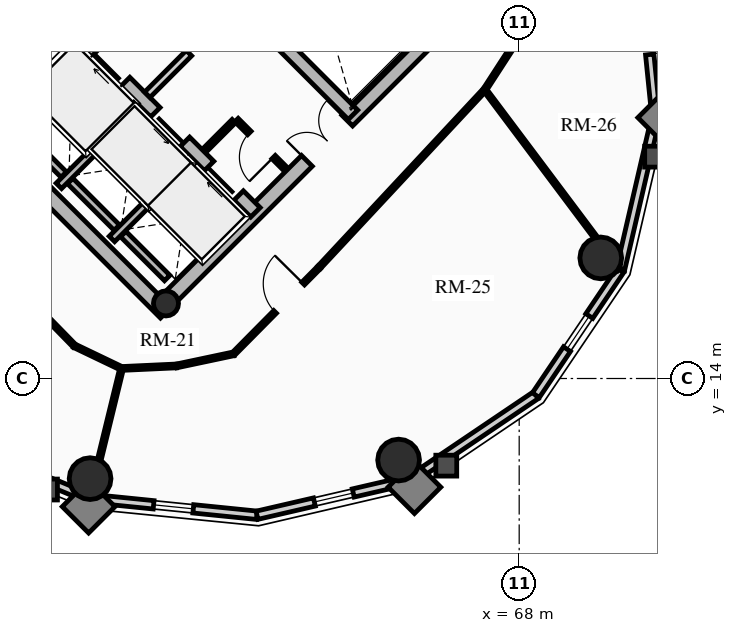
"""IFC4 building model, lengths in metres.
Left out: names, types, materials, properties, quantities, classifications, styles, units other than length and angle.
Written with IfcOpenShell. Run it as: python <this file> out.ifc"""

import sys

from ifc_helpers import new_model, si_unit, direction, frame, frame_2d, origin, origin_2d, place, context, subcontext, project, spatial, rectangle, circle, hollow_circle, extrude, source, transform, mapped, element, fill, save


model = new_model("IFC4")
c1 = context("Model", 3, precision=1e-05, world=origin(), true_north=direction((0.0, 1.0)))
c2 = subcontext(c1, "Body", "Model", "MODEL_VIEW")
j1 = project(units=[si_unit("LENGTHUNIT", "METRE"), si_unit("PLANEANGLEUNIT", "RADIAN")], contexts=[c1])
p1 = place(None, origin())
s1 = spatial("IfcSite", under=j1, at=p1, CompositionType="ELEMENT")
p2 = place(p1, origin())
s2 = spatial("IfcBuilding", under=s1, at=p2, CompositionType="ELEMENT")
p3 = place(p2, frame((0.0, 0.0, 196.66)))
s3 = spatial("IfcBuildingStorey", under=s2, at=p3, CompositionType="ELEMENT", Elevation=196.66)
p4 = place(p3, frame((58.702, 15.732, 0.0), z_axis=(0.0, 0.0, 1.0), x_axis=(-0.707106781187, 0.707106781187, 0.0)))
e1 = element("IfcWall", 1, at=p4, inside=s3, PredefinedType="SHEAR", context=c2, shape_type="SweptSolid", body=[
    extrude(rectangle(XDim=14.1, YDim=0.4, at=frame_2d((7.05, 0.0))), origin(), (0.0, 0.0, 1.0), 2.91),
])
p5 = place(p3, frame((58.561, 15.873, 0.0), z_axis=(0.0, 0.0, 1.0), x_axis=(0.707106781187, 0.707106781187, 0.0)))
e2 = element("IfcWall", 2, at=p5, inside=s3, PredefinedType="SHEAR", context=c2, shape_type="SweptSolid", body=[
    extrude(rectangle(XDim=10.7, YDim=0.4, at=frame_2d((5.35, 0.0))), origin(), (0.0, 0.0, 1.0), 2.91),
])
m1 = source(origin(), c2, "Body", "SweptSolid", [
    extrude(rectangle(XDim=1.5, YDim=2.02, at=frame_2d((0.75, 1.01))), frame((0.0, 0.21, 0.0), z_axis=(0.0, -1.0, 0.0), x_axis=(1.0, 0.0, 0.0)), (0.0, 0.0, 1.0), 0.42),
])
p6 = place(p5, frame((5.45, 0.0, 0.0)))
e3 = element("IfcOpeningElement", 3, at=p6, cuts=e2, PredefinedType="OPENING", context=c2, shape_type="MappedRepresentation", body=[
    mapped(m1, transform((0.0, 0.0, 0.0), x_axis=(1.0, 0.0, 0.0), y_axis=(0.0, 1.0, 0.0), z_axis=(0.0, 0.0, 1.0), scale=1.0)),
])
p7 = place(p3, frame((61.06, 18.373, 0.0), z_axis=(0.0, 0.0, 1.0), x_axis=(-0.707106781187, 0.707106781187, 0.0)))
e4 = element("IfcWall", 4, at=p7, inside=s3, PredefinedType="SHEAR", context=c2, shape_type="SweptSolid", body=[
    extrude(rectangle(XDim=13.7, YDim=0.35, at=frame_2d((6.85, 0.0))), origin(), (0.0, 0.0, 1.0), 2.91),
])
m2 = source(origin(), c2, "Body", "SweptSolid", [
    extrude(rectangle(XDim=1.1, YDim=2.015, at=frame_2d((0.55, 1.007))), frame((0.0, 0.185, 0.0), z_axis=(0.0, -1.0, 0.0), x_axis=(1.0, 0.0, 0.0)), (0.0, 0.0, 1.0), 0.37),
])
p8 = place(p7, frame((4.85, 0.0, 0.0)))
e5 = element("IfcOpeningElement", 5, at=p8, cuts=e4, PredefinedType="OPENING", context=c2, shape_type="MappedRepresentation", body=[
    mapped(m2, transform((0.0, 0.0, 0.0), x_axis=(1.0, 0.0, 0.0), y_axis=(0.0, 1.0, 0.0), z_axis=(0.0, 0.0, 1.0), scale=1.0)),
])
p9 = place(p7, frame((0.625, 0.0, 0.0)))
e6 = element("IfcOpeningElement", 6, at=p9, cuts=e4, PredefinedType="OPENING", context=c2, shape_type="MappedRepresentation", body=[
    mapped(m2, transform((0.0, 0.0, 0.0), x_axis=(1.0, 0.0, 0.0), y_axis=(0.0, 1.0, 0.0), z_axis=(0.0, 0.0, 1.0), scale=1.0)),
])
p10 = place(p7, frame((2.625, 0.0, 0.0)))
e7 = element("IfcOpeningElement", 7, at=p10, cuts=e4, PredefinedType="OPENING", context=c2, shape_type="MappedRepresentation", body=[
    mapped(m2, transform((0.0, 0.0, 0.0), x_axis=(1.0, 0.0, 0.0), y_axis=(0.0, 1.0, 0.0), z_axis=(0.0, 0.0, 1.0), scale=1.0)),
])
m3 = source(origin(), c2, "Body", "SweptSolid", [
    extrude(rectangle(XDim=1.15, YDim=2.02, at=frame_2d((0.575, 1.01))), frame((0.0, 0.185, 0.0), z_axis=(0.0, -1.0, 0.0), x_axis=(1.0, 0.0, 0.0)), (0.0, 0.0, 1.0), 0.37),
])
p11 = place(p7, frame((7.27, 0.0, 0.0)))
e8 = element("IfcOpeningElement", 8, at=p11, cuts=e4, PredefinedType="OPENING", context=c2, shape_type="MappedRepresentation", body=[
    mapped(m3, transform((0.0, 0.0, 0.0), x_axis=(1.0, 0.0, 0.0), y_axis=(0.0, 1.0, 0.0), z_axis=(0.0, 0.0, 1.0), scale=1.0)),
])
p12 = place(p3, frame((63.627, 20.94, 0.0), z_axis=(0.0, 0.0, 1.0), x_axis=(-0.707119496762, 0.707094065383, 0.0)))
e9 = element("IfcWall", 9, at=p12, inside=s3, PredefinedType="SHEAR", context=c2, shape_type="SweptSolid", body=[
    extrude(rectangle(XDim=9.6, YDim=0.35, at=frame_2d((4.8, 0.0))), origin(), (0.0, 0.0, 1.0), 2.91),
])
p13 = place(p12, frame((5.28, 0.0, 0.0)))
e10 = element("IfcOpeningElement", 10, at=p13, cuts=e9, PredefinedType="OPENING", context=c2, shape_type="MappedRepresentation", body=[
    mapped(m3, transform((0.0, 0.0, 0.0), x_axis=(1.0, 0.0, 0.0), y_axis=(0.0, 1.0, 0.0), z_axis=(0.0, 0.0, 1.0), scale=1.0)),
])
p14 = place(p3, frame((53.784, 21.003, 0.0), z_axis=(0.0, 0.0, 1.0), x_axis=(0.707106781187, 0.707106781187, 0.0)))
e11 = element("IfcWall", 11, at=p14, inside=s3, PredefinedType="SHEAR", context=c2, shape_type="SweptSolid", body=[
    extrude(rectangle(XDim=3.285, YDim=0.35, at=frame_2d((1.643, 0.0))), origin(), (0.0, 0.0, 1.0), 2.91),
])
p15 = place(p3, frame((58.706, 15.976, 0.0), z_axis=(0.0, 0.0, 1.0), x_axis=(0.707106781187, 0.707106781187, 0.0)))
e12 = element("IfcColumn", 12, at=p15, inside=s3, PredefinedType="COLUMN", context=c2, shape_type="SweptSolid", body=[
    extrude(hollow_circle(Radius=0.33, WallThickness=0.025, at=origin_2d()), origin(), (0.0, 0.0, 1.0), 2.91),
])
for number, where, z_axis, x_axis in (
    (13, (56.709, 11.365, 0.0), (0.0, 0.0, 1.0), (1.0, 0.0, 0.0)),
    (14, (64.827, 11.854, 0.0), (0.0, 0.0, 1.0), (1.0, 0.0, 0.0)),
    (15, (70.146, 17.173, 0.0), (0.0, 0.0, 1.0), (1.0, 0.0, 0.0)),
):
    element("IfcColumn", number, at=place(p3, frame(where, z_axis=z_axis, x_axis=x_axis)), inside=s3, PredefinedType="USERDEFINED", context=c2, shape_type="SweptSolid", body=[
        extrude(circle(Radius=0.55, at=origin_2d()), origin(), (0.0, 0.0, 1.0), 2.91),
    ])
p16 = place(p3, frame((56.705, 10.845, 0.0), z_axis=(0.0, 0.0, 1.0), x_axis=(-0.924447353237, 0.381309704956, 0.0)))
e16 = element("IfcWall", 16, at=p16, inside=s3, PredefinedType="SOLIDWALL", context=c2, shape_type="SweptSolid", body=[
    extrude(rectangle(XDim=4.671, YDim=0.22, at=frame_2d((2.335, 0.0))), origin(), (0.0, 0.0, 1.0), 2.322),
])
p17 = place(p3, frame((61.1, 10.401, 0.0), z_axis=(0.0, 0.0, 1.0), x_axis=(-0.994929930991, 0.100570534541, 0.0)))
e17 = element("IfcWall", 17, at=p17, inside=s3, PredefinedType="SOLIDWALL", context=c2, shape_type="SweptSolid", body=[
    extrude(rectangle(XDim=4.418, YDim=0.22, at=frame_2d((2.209, 0.0))), origin(), (0.0, 0.0, 1.0), 2.322),
])
m4 = source(origin(), c2, "Body", "SweptSolid", [
    extrude(rectangle(XDim=1.05, YDim=1.3, at=frame_2d((0.525, 0.65))), frame((0.0, 0.12, 0.0), z_axis=(0.0, -1.0, 0.0), x_axis=(1.0, 0.0, 0.0)), (0.0, 0.0, 1.0), 0.24),
])
p18 = place(p17, frame((1.684, 0.0, 0.65)))
e18 = element("IfcOpeningElement", 18, at=p18, cuts=e17, PredefinedType="OPENING", context=c2, shape_type="MappedRepresentation", body=[
    mapped(m4, transform((0.0, 0.0, 0.0), x_axis=(1.0, 0.0, 0.0), y_axis=(0.0, 1.0, 0.0), z_axis=(0.0, 0.0, 1.0), scale=1.0)),
])
p19 = place(p3, frame((65.144, 11.337, 0.0), z_axis=(0.0, 0.0, 1.0), x_axis=(-0.974249228678, -0.225473813158, 0.0)))
e19 = element("IfcWall", 19, at=p19, inside=s3, PredefinedType="SOLIDWALL", context=c2, shape_type="SweptSolid", body=[
    extrude(rectangle(XDim=4.15, YDim=0.22, at=frame_2d((2.075, 0.0))), origin(), (0.0, 0.0, 1.0), 2.322),
])
p20 = place(p19, frame((1.55, 0.0, 0.65)))
e20 = element("IfcOpeningElement", 20, at=p20, cuts=e19, PredefinedType="OPENING", context=c2, shape_type="MappedRepresentation", body=[
    mapped(m4, transform((0.0, 0.0, 0.0), x_axis=(1.0, 0.0, 0.0), y_axis=(0.0, 1.0, 0.0), z_axis=(0.0, 0.0, 1.0), scale=1.0)),
])
p21 = place(p3, frame((68.439, 13.561, 0.0), z_axis=(0.0, 0.0, 1.0), x_axis=(-0.828833723692, -0.559495003079, 0.0)))
e21 = element("IfcWall", 21, at=p21, inside=s3, PredefinedType="SOLIDWALL", context=c2, shape_type="SweptSolid", body=[
    extrude(rectangle(XDim=3.976, YDim=0.22, at=frame_2d((1.988, 0.0))), origin(), (0.0, 0.0, 1.0), 2.322),
])
p22 = place(p3, frame((70.663, 16.856, 0.0), z_axis=(0.0, 0.0, 1.0), x_axis=(-0.559495003079, -0.828833723692, 0.0)))
e22 = element("IfcWall", 22, at=p22, inside=s3, PredefinedType="SOLIDWALL", context=c2, shape_type="SweptSolid", body=[
    extrude(rectangle(XDim=3.976, YDim=0.22, at=frame_2d((1.988, 0.0))), origin(), (0.0, 0.0, 1.0), 2.322),
])
p23 = place(p22, frame((1.463, 0.0, 0.65)))
e23 = element("IfcOpeningElement", 23, at=p23, cuts=e22, PredefinedType="OPENING", context=c2, shape_type="MappedRepresentation", body=[
    mapped(m4, transform((0.0, 0.0, 0.0), x_axis=(1.0, 0.0, 0.0), y_axis=(0.0, 1.0, 0.0), z_axis=(0.0, 0.0, 1.0), scale=1.0)),
])
p24 = place(p3, frame((71.599, 20.9, 0.0), z_axis=(0.0, 0.0, 1.0), x_axis=(-0.225473813158, -0.974249228678, 0.0)))
e24 = element("IfcWall", 24, at=p24, inside=s3, PredefinedType="SOLIDWALL", context=c2, shape_type="SweptSolid", body=[
    extrude(rectangle(XDim=4.15, YDim=0.22, at=frame_2d((2.075, 0.0))), origin(), (0.0, 0.0, 1.0), 2.322),
])
p25 = place(p3, frame((71.155, 25.295, 0.0), z_axis=(0.0, 0.0, 1.0), x_axis=(0.100570534541, -0.994929930991, 0.0)))
e25 = element("IfcWall", 25, at=p25, inside=s3, PredefinedType="SOLIDWALL", context=c2, shape_type="SweptSolid", body=[
    extrude(rectangle(XDim=4.418, YDim=0.22, at=frame_2d((2.209, 0.0))), origin(), (0.0, 0.0, 1.0), 2.322),
])
m5 = source(origin(), c2, "Body", "SweptSolid", [
    extrude(rectangle(XDim=1.15, YDim=2.005, at=frame_2d((0.575, 1.002))), frame((0.0, 0.12, 0.0), z_axis=(0.0, -1.0, 0.0), x_axis=(1.0, 0.0, 0.0)), (0.0, 0.0, 1.0), 0.24),
])
p26 = place(p25, frame((1.634, 0.0, 0.0)))
e26 = element("IfcOpeningElement", 26, at=p26, cuts=e25, PredefinedType="OPENING", context=c2, shape_type="MappedRepresentation", body=[
    mapped(m5, transform((0.0, 0.0, 0.0), x_axis=(1.0, 0.0, 0.0), y_axis=(0.0, 1.0, 0.0), z_axis=(0.0, 0.0, 1.0), scale=1.0)),
])
p27 = place(p3, frame((55.888, 19.069, 0.0), z_axis=(0.0, 0.0, 1.0), x_axis=(0.707106781187, 0.707106781187, 0.0)))
e27 = element("IfcWall", 27, at=p27, inside=s3, PredefinedType="SHEAR", context=c2, shape_type="SweptSolid", body=[
    extrude(rectangle(XDim=2.97, YDim=0.2, at=frame_2d((1.485, 0.0))), origin(), (0.0, 0.0, 1.0), 2.91),
])
p28 = place(p3, frame((56.015, 19.366, 0.0), z_axis=(0.0, 0.0, 1.0), x_axis=(-0.707106781187, 0.707106781187, 0.0)))
e28 = element("IfcWall", 28, at=p28, inside=s3, PredefinedType="SHEAR", context=c2, shape_type="SweptSolid", body=[
    extrude(rectangle(XDim=2.44, YDim=0.2, at=frame_2d((1.22, 0.0))), origin(), (0.0, 0.0, 1.0), 2.91),
])
p29 = place(p3, frame((57.284, 17.673, 0.0), z_axis=(0.0, 0.0, 1.0), x_axis=(0.707147878904, 0.70706568108, 0.0)))
e29 = element("IfcWall", 29, at=p29, inside=s3, PredefinedType="SHEAR", context=c2, shape_type="SweptSolid", body=[
    extrude(rectangle(XDim=2.97, YDim=0.2, at=frame_2d((1.485, 0.0))), origin(), (0.0, 0.0, 1.0), 2.91),
])
p30 = place(p3, frame((57.412, 17.97, 0.0), z_axis=(0.0, 0.0, 1.0), x_axis=(-0.707106781187, 0.707106781187, 0.0)))
e30 = element("IfcWall", 30, at=p30, inside=s3, PredefinedType="SHEAR", context=c2, shape_type="SweptSolid", body=[
    extrude(rectangle(XDim=1.735, YDim=0.2, at=frame_2d((0.867, 0.0))), origin(), (0.0, 0.0, 1.0), 2.91),
])
p31 = place(p3, frame((58.737, 16.644, 0.0), z_axis=(0.0, 0.0, 1.0), x_axis=(-0.707032117043, 0.707181437447, 0.0)))
e31 = element("IfcWall", 31, at=p31, inside=s3, PredefinedType="SHEAR", context=c2, shape_type="SweptSolid", body=[
    extrude(rectangle(XDim=1.635, YDim=0.2, at=frame_2d((0.817, 0.0))), origin(), (0.0, 0.0, 1.0), 2.91),
])
p32 = place(p3, frame((58.214, 21.467, 0.0), z_axis=(0.0, 0.0, 1.0), x_axis=(0.707106781187, 0.707106781187, 0.0)))
e32 = element("IfcWall", 32, at=p32, inside=s3, PredefinedType="PARTITIONING", context=c2, shape_type="SweptSolid", body=[
    extrude(rectangle(XDim=3.28, YDim=0.2, at=frame_2d((1.64, 0.0))), origin(), (0.0, 0.0, 1.0), 2.685),
])
m6 = source(origin(), c2, "Body", "SweptSolid", [
    extrude(rectangle(XDim=1.5, YDim=2.02, at=frame_2d((0.75, 1.01))), frame((0.0, 0.11, 0.0), z_axis=(0.0, -1.0, 0.0), x_axis=(1.0, 0.0, 0.0)), (0.0, 0.0, 1.0), 0.22),
])
p33 = place(p32, frame((1.55, 0.0, 0.0)))
e33 = element("IfcOpeningElement", 33, at=p33, cuts=e32, PredefinedType="OPENING", context=c2, shape_type="MappedRepresentation", body=[
    mapped(m6, transform((0.0, 0.0, 0.0), x_axis=(1.0, 0.0, 0.0), y_axis=(0.0, 1.0, 0.0), z_axis=(0.0, 0.0, 1.0), scale=1.0)),
])
p34 = place(p3, frame((61.835, 19.529, 0.0), z_axis=(0.0, 0.0, 1.0), x_axis=(-0.707174592913, 0.707038962956, 0.0)))
e34 = element("IfcWall", 34, at=p34, inside=s3, PredefinedType="PARTITIONING", context=c2, shape_type="SweptSolid", body=[
    extrude(rectangle(XDim=1.8, YDim=0.125, at=frame_2d((0.9, 0.0))), origin(), (0.0, 0.0, 1.0), 2.685),
])
m7 = source(origin(), c2, "Body", "SweptSolid", [
    extrude(rectangle(XDim=0.9, YDim=2.005, at=frame_2d((0.45, 1.002))), frame((0.0, 0.073, 0.0), z_axis=(0.0, -1.0, 0.0), x_axis=(1.0, 0.0, 0.0)), (0.0, 0.0, 1.0), 0.145),
])
p35 = place(p34, frame((0.42, 0.0, 0.0)))
e35 = element("IfcOpeningElement", 35, at=p35, cuts=e34, PredefinedType="OPENING", context=c2, shape_type="MappedRepresentation", body=[
    mapped(m7, transform((0.0, 0.0, 0.0), x_axis=(1.0, 0.0, 0.0), y_axis=(0.0, 1.0, 0.0), z_axis=(0.0, 0.0, 1.0), scale=1.0)),
])
p36 = place(p3, frame((59.713, 19.996, 0.0), z_axis=(0.0, 0.0, 1.0), x_axis=(0.707217726, 0.706995818963, 0.0)))
e36 = element("IfcWall", 36, at=p36, inside=s3, PredefinedType="PARTITIONING", context=c2, shape_type="SweptSolid", body=[
    extrude(rectangle(XDim=1.1, YDim=0.125, at=frame_2d((0.55, 0.0))), origin(), (0.0, 0.0, 1.0), 2.685),
])
p37 = place(p3, frame((52.126, 19.126, 0.0), z_axis=(0.0, 0.0, 1.0), x_axis=(0.698979087027, -0.715142108884, 0.0)))
e37 = element("IfcWall", 37, at=p37, inside=s3, PredefinedType="MOVABLE", context=c2, shape_type="SweptSolid", body=[
    extrude(rectangle(XDim=5.966, YDim=0.1, at=frame_2d((2.983, 0.0))), origin(), (0.0, 0.0, 1.0), 2.322),
])
p38 = place(p3, frame((56.296, 14.859, 0.0), z_axis=(0.0, 0.0, 1.0), x_axis=(0.90178292445, -0.432189260823, 0.0)))
e38 = element("IfcWall", 38, at=p38, inside=s3, PredefinedType="MOVABLE", context=c2, shape_type="SweptSolid", body=[
    extrude(rectangle(XDim=1.377, YDim=0.1, at=frame_2d((0.688, 0.0))), origin(), (0.0, 0.0, 1.0), 2.255),
])
p39 = place(p3, frame((57.538, 14.264, 0.0), z_axis=(0.0, 0.0, 1.0), x_axis=(0.99892990172, 0.046249880546, 0.0)))
e39 = element("IfcWall", 39, at=p39, inside=s3, PredefinedType="MOVABLE", context=c2, shape_type="SweptSolid", body=[
    extrude(rectangle(XDim=1.446, YDim=0.1, at=frame_2d((0.723, 0.0))), origin(), (0.0, 0.0, 1.0), 2.322),
])
p40 = place(p3, frame((58.983, 14.331, 0.0), z_axis=(0.0, 0.0, 1.0), x_axis=(0.978328007546, 0.207061125397, 0.0)))
e40 = element("IfcWall", 40, at=p40, inside=s3, PredefinedType="MOVABLE", context=c2, shape_type="SweptSolid", body=[
    extrude(rectangle(XDim=1.534, YDim=0.1, at=frame_2d((0.767, 0.0))), origin(), (0.0, 0.0, 1.0), 2.255),
])
p41 = place(p3, frame((60.484, 14.648, 0.0), z_axis=(0.0, 0.0, 1.0), x_axis=(0.703398221944, 0.710795991383, 0.0)))
e41 = element("IfcWall", 41, at=p41, inside=s3, PredefinedType="MOVABLE", context=c2, shape_type="SweptSolid", body=[
    extrude(rectangle(XDim=3.201, YDim=0.1, at=frame_2d((1.601, 0.0))), origin(), (0.0, 0.0, 1.0), 2.322),
])
m8 = source(origin(), c2, "Body", "SweptSolid", [
    extrude(rectangle(XDim=1.05, YDim=2.015, at=frame_2d((0.525, 1.007))), frame((0.0, 0.06, 0.0), z_axis=(0.0, -1.0, 0.0), x_axis=(1.0, 0.0, 0.0)), (0.0, 0.0, 1.0), 0.12),
])
p42 = place(p41, frame((1.553, 0.0, 0.0)))
e42 = element("IfcOpeningElement", 42, at=p42, cuts=e41, PredefinedType="OPENING", context=c2, shape_type="MappedRepresentation", body=[
    mapped(m8, transform((0.0, 0.0, 0.0), x_axis=(1.0, 0.0, 0.0), y_axis=(0.0, 1.0, 0.0), z_axis=(0.0, 0.0, 1.0), scale=1.0)),
])
p43 = place(p3, frame((62.736, 16.924, 0.0), z_axis=(0.0, 0.0, 1.0), x_axis=(0.681946700833, 0.731401871219, 0.0)))
e43 = element("IfcWall", 43, at=p43, inside=s3, PredefinedType="MOVABLE", context=c2, shape_type="SweptSolid", body=[
    extrude(rectangle(XDim=6.393, YDim=0.1, at=frame_2d((3.196, 0.0))), origin(), (0.0, 0.0, 1.0), 2.255),
])
p44 = place(p3, frame((67.095, 21.6, 0.0), z_axis=(0.0, 0.0, 1.0), x_axis=(0.543773190184, 0.839232219137, 0.0)))
e44 = element("IfcWall", 44, at=p44, inside=s3, PredefinedType="MOVABLE", context=c2, shape_type="SweptSolid", body=[
    extrude(rectangle(XDim=1.823, YDim=0.1, at=frame_2d((0.911, 0.0))), origin(), (0.0, 0.0, 1.0), 2.255),
])
p45 = place(p3, frame((57.538, 14.264, 0.0), z_axis=(0.0, 0.0, 1.0), x_axis=(-0.237377006249, -0.971417601706, 0.0)))
e45 = element("IfcWall", 45, at=p45, inside=s3, PredefinedType="MOVABLE", context=c2, shape_type="SweptSolid", body=[
    extrude(rectangle(XDim=3.499, YDim=0.1, at=frame_2d((1.75, 0.0))), origin(), (0.0, 0.0, 1.0), 2.322),
])
p46 = place(p3, frame((67.095, 21.6, 0.0), z_axis=(0.0, 0.0, 1.0), x_axis=(0.599947190798, -0.800039604178, 0.0)))
e46 = element("IfcWall", 46, at=p46, inside=s3, PredefinedType="MOVABLE", context=c2, shape_type="SweptSolid", body=[
    extrude(rectangle(XDim=5.918, YDim=0.1, at=frame_2d((2.959, 0.0))), origin(), (0.0, 0.0, 1.0), 2.322),
])
m9 = source(origin(), c2, "Body", "SweptSolid", [
    extrude(rectangle(XDim=1.05, YDim=1.3, at=frame_2d((0.525, 0.65))), frame((0.0, 0.03, 0.0), z_axis=(0.0, -1.0, 0.0), x_axis=(1.0, 0.0, 0.0)), (0.0, 0.0, 1.0), 0.06),
])
p47 = place(p18, origin())
e47 = element("IfcWindow", 47, at=p47, inside=s3, PartitioningType="SINGLE_PANEL", PredefinedType="WINDOW", context=c2, shape_type="MappedRepresentation", body=[
    mapped(m9, transform((0.0, 0.0, 0.0), x_axis=(1.0, 0.0, 0.0), y_axis=(0.0, 1.0, 0.0), z_axis=(0.0, 0.0, 1.0), scale=1.0)),
])
fill(e18, e47)
p48 = place(p20, origin())
e48 = element("IfcWindow", 48, at=p48, inside=s3, PartitioningType="SINGLE_PANEL", PredefinedType="WINDOW", context=c2, shape_type="MappedRepresentation", body=[
    mapped(m9, transform((0.0, 0.0, 0.0), x_axis=(1.0, 0.0, 0.0), y_axis=(0.0, 1.0, 0.0), z_axis=(0.0, 0.0, 1.0), scale=1.0)),
])
fill(e20, e48)
p49 = place(p23, origin())
e49 = element("IfcWindow", 49, at=p49, inside=s3, PartitioningType="SINGLE_PANEL", PredefinedType="WINDOW", context=c2, shape_type="MappedRepresentation", body=[
    mapped(m9, transform((0.0, 0.0, 0.0), x_axis=(1.0, 0.0, 0.0), y_axis=(0.0, 1.0, 0.0), z_axis=(0.0, 0.0, 1.0), scale=1.0)),
])
fill(e23, e49)
m10 = source(origin(), c2, "Body", "SweptSolid", [
    extrude(rectangle(XDim=1.15, YDim=2.005, at=frame_2d((0.575, 1.002))), frame((0.0, 0.025, 0.0), z_axis=(0.0, -1.0, 0.0), x_axis=(1.0, 0.0, 0.0)), (0.0, 0.0, 1.0), 0.05),
])
p50 = place(p26, origin())
e50 = element("IfcDoor", 50, at=p50, inside=s3, OperationType="SINGLE_SWING_LEFT", PredefinedType="DOOR", context=c2, shape_type="MappedRepresentation", body=[
    mapped(m10, transform((0.0, 0.0, 0.0), x_axis=(1.0, 0.0, 0.0), y_axis=(0.0, 1.0, 0.0), z_axis=(0.0, 0.0, 1.0), scale=1.0)),
])
fill(e26, e50)
m11 = source(origin(), c2, "Body", "SweptSolid", [
    extrude(rectangle(XDim=1.1, YDim=2.015, at=frame_2d((0.55, 1.007))), frame((0.0, 0.025, 0.0), z_axis=(0.0, -1.0, 0.0), x_axis=(1.0, 0.0, 0.0)), (0.0, 0.0, 1.0), 0.05),
])
p51 = place(p8, origin())
e51 = element("IfcDoor", 51, at=p51, inside=s3, OperationType="SLIDING_TO_RIGHT", PredefinedType="DOOR", context=c2, shape_type="MappedRepresentation", body=[
    mapped(m11, transform((0.0, 0.0, 0.0), x_axis=(1.0, 0.0, 0.0), y_axis=(0.0, 1.0, 0.0), z_axis=(0.0, 0.0, 1.0), scale=1.0)),
])
fill(e5, e51)
p52 = place(p9, origin())
e52 = element("IfcDoor", 52, at=p52, inside=s3, OperationType="SLIDING_TO_RIGHT", PredefinedType="DOOR", context=c2, shape_type="MappedRepresentation", body=[
    mapped(m11, transform((0.0, 0.0, 0.0), x_axis=(1.0, 0.0, 0.0), y_axis=(0.0, 1.0, 0.0), z_axis=(0.0, 0.0, 1.0), scale=1.0)),
])
fill(e6, e52)
p53 = place(p10, origin())
e53 = element("IfcDoor", 53, at=p53, inside=s3, OperationType="SLIDING_TO_LEFT", PredefinedType="DOOR", context=c2, shape_type="MappedRepresentation", body=[
    mapped(m11, transform((0.0, 0.0, 0.0), x_axis=(1.0, 0.0, 0.0), y_axis=(0.0, 1.0, 0.0), z_axis=(0.0, 0.0, 1.0), scale=1.0)),
])
fill(e7, e53)
m12 = source(origin(), c2, "Body", "SweptSolid", [
    extrude(rectangle(XDim=1.5, YDim=2.02, at=frame_2d((0.75, 1.01))), frame((0.0, 0.025, 0.0), z_axis=(0.0, -1.0, 0.0), x_axis=(1.0, 0.0, 0.0)), (0.0, 0.0, 1.0), 0.05),
])
p54 = place(p6, origin())
e54 = element("IfcDoor", 54, at=p54, inside=s3, OperationType="DOUBLE_DOOR_SINGLE_SWING", PredefinedType="DOOR", context=c2, shape_type="MappedRepresentation", body=[
    mapped(m12, transform((0.0, 0.0, 0.0), x_axis=(1.0, 0.0, 0.0), y_axis=(0.0, 1.0, 0.0), z_axis=(0.0, 0.0, 1.0), scale=1.0)),
])
fill(e3, e54)
p55 = place(p33, origin())
e55 = element("IfcDoor", 55, at=p55, inside=s3, OperationType="DOUBLE_DOOR_SINGLE_SWING", PredefinedType="DOOR", context=c2, shape_type="MappedRepresentation", body=[
    mapped(m12, transform((0.0, 0.0, 0.0), x_axis=(1.0, 0.0, 0.0), y_axis=(0.0, 1.0, 0.0), z_axis=(0.0, 0.0, 1.0), scale=1.0)),
])
fill(e33, e55)
m13 = source(origin(), c2, "Body", "SweptSolid", [
    extrude(rectangle(XDim=0.9, YDim=2.005, at=frame_2d((0.45, 1.002))), frame((0.0, 0.025, 0.0), z_axis=(0.0, -1.0, 0.0), x_axis=(1.0, 0.0, 0.0)), (0.0, 0.0, 1.0), 0.05),
])
p56 = place(p35, origin())
e56 = element("IfcDoor", 56, at=p56, inside=s3, OperationType="SINGLE_SWING_LEFT", PredefinedType="DOOR", context=c2, shape_type="MappedRepresentation", body=[
    mapped(m13, transform((0.0, 0.0, 0.0), x_axis=(1.0, 0.0, 0.0), y_axis=(0.0, 1.0, 0.0), z_axis=(0.0, 0.0, 1.0), scale=1.0)),
])
fill(e35, e56)
m14 = source(origin(), c2, "Body", "SweptSolid", [
    extrude(rectangle(XDim=1.05, YDim=2.015, at=frame_2d((0.525, 1.007))), frame((0.0, 0.025, 0.0), z_axis=(0.0, -1.0, 0.0), x_axis=(1.0, 0.0, 0.0)), (0.0, 0.0, 1.0), 0.05),
])
p57 = place(p42, origin())
e57 = element("IfcDoor", 57, at=p57, inside=s3, OperationType="SINGLE_SWING_RIGHT", PredefinedType="DOOR", context=c2, shape_type="MappedRepresentation", body=[
    mapped(m14, transform((0.0, 0.0, 0.0), x_axis=(1.0, 0.0, 0.0), y_axis=(0.0, 1.0, 0.0), z_axis=(0.0, 0.0, 1.0), scale=1.0)),
])
fill(e42, e57)
save(model, sys.argv[1])
